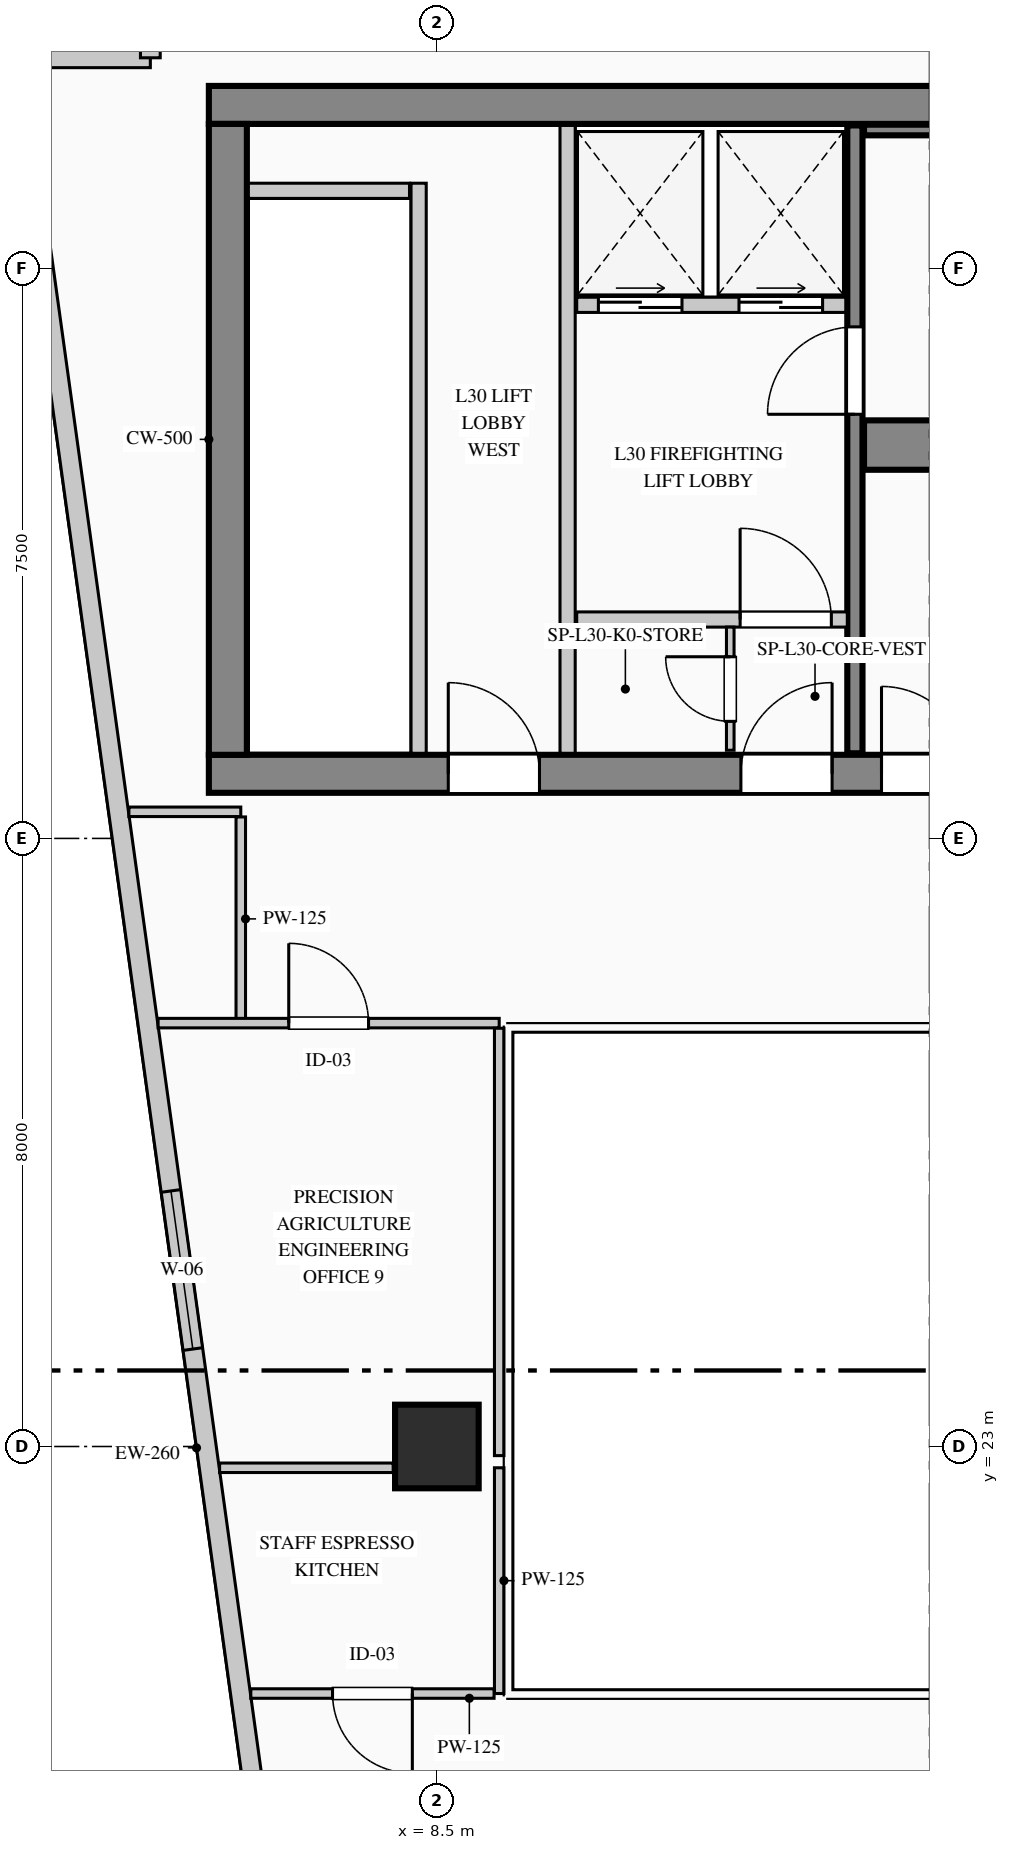
"""IFC4 building model, lengths in metres.
Left out: names, types, materials, properties, quantities, classifications, styles, units other than length and angle.
Written with IfcOpenShell. Run it as: python <this file> out.ifc"""

import sys

from ifc_helpers import new_model, si_unit, direction, frame, frame_2d, origin, origin_2d, place, context, subcontext, project, spatial, rectangle, extrude, element, fill, save


model = new_model("IFC4")
c1 = context("Model", 3, precision=1e-05, world=origin(), true_north=direction((0.0, 1.0)))
c2 = subcontext(c1, "Body", "Model", "MODEL_VIEW")
j1 = project(units=[si_unit("LENGTHUNIT", "METRE"), si_unit("PLANEANGLEUNIT", "RADIAN")], contexts=[c1])
p1 = place(None, origin())
s1 = spatial("IfcSite", under=j1, at=p1, CompositionType="ELEMENT")
p2 = place(p1, origin())
s2 = spatial("IfcBuilding", under=s1, at=p2, CompositionType="ELEMENT")
p3 = place(p2, frame((0.0, 0.0, 131.15)))
s3 = spatial("IfcBuildingStorey", under=s2, at=p3, CompositionType="ELEMENT", Elevation=131.15)
p4 = place(p3, frame((5.5, 40.65, 0.0), z_axis=(0.0, 0.0, 1.0), x_axis=(1.0, 0.0, 0.0)))
e1 = element("IfcWall", 1, at=p4, inside=s3, PredefinedType="SHEAR", context=c2, shape_type="SweptSolid", body=[
    extrude(rectangle(XDim=17.85, YDim=0.5, at=frame_2d((8.925, 0.0))), origin(), (0.0, 0.0, 1.0), 3.95),
])
p5 = place(p4, frame((15.945, 0.0, 0.0)))
e2 = element("IfcOpeningElement", 2, at=p5, cuts=e1, PredefinedType="OPENING", context=c2, shape_type="SweptSolid", body=[
    extrude(rectangle(XDim=1.18, YDim=2.25, at=frame_2d((0.59, 1.125))), frame((0.0, 0.26, 0.0), z_axis=(0.0, -1.0, 0.0), x_axis=(1.0, 0.0, 0.0)), (0.0, 0.0, 1.0), 0.52),
])
p6 = place(p3, frame((5.5, 31.85, 0.0), z_axis=(0.0, 0.0, 1.0), x_axis=(1.0, 0.0, 0.0)))
e3 = element("IfcWall", 3, at=p6, inside=s3, PredefinedType="SHEAR", context=c2, shape_type="SweptSolid", body=[
    extrude(rectangle(XDim=17.85, YDim=0.5, at=frame_2d((8.925, 0.0))), origin(), (0.0, 0.0, 1.0), 3.95),
])
p7 = place(p6, frame((3.15, 0.0, 0.0)))
e4 = element("IfcOpeningElement", 4, at=p7, cuts=e3, PredefinedType="OPENING", context=c2, shape_type="SweptSolid", body=[
    extrude(rectangle(XDim=1.2, YDim=2.2, at=frame_2d((0.6, 1.1))), frame((0.0, 0.26, 0.0), z_axis=(0.0, -1.0, 0.0), x_axis=(1.0, 0.0, 0.0)), (0.0, 0.0, 1.0), 0.52),
])
p8 = place(p6, frame((7.0, 0.0, 0.0)))
e5 = element("IfcOpeningElement", 5, at=p8, cuts=e3, PredefinedType="OPENING", context=c2, shape_type="SweptSolid", body=[
    extrude(rectangle(XDim=1.2, YDim=2.2, at=frame_2d((0.6, 1.1))), frame((0.0, 0.26, 0.0), z_axis=(0.0, -1.0, 0.0), x_axis=(1.0, 0.0, 0.0)), (0.0, 0.0, 1.0), 0.52),
])
p9 = place(p6, frame((8.85, 0.0, 0.0)))
e6 = element("IfcOpeningElement", 6, at=p9, cuts=e3, PredefinedType="OPENING", context=c2, shape_type="SweptSolid", body=[
    extrude(rectangle(XDim=1.15, YDim=2.2, at=frame_2d((0.575, 1.1))), frame((0.0, 0.26, 0.0), z_axis=(0.0, -1.0, 0.0), x_axis=(1.0, 0.0, 0.0)), (0.0, 0.0, 1.0), 0.52),
])
p10 = place(p6, frame((15.95, 0.0, 0.0)))
e7 = element("IfcOpeningElement", 7, at=p10, cuts=e3, PredefinedType="OPENING", context=c2, shape_type="SweptSolid", body=[
    extrude(rectangle(XDim=1.2, YDim=2.2, at=frame_2d((0.6, 1.1))), frame((0.0, 0.26, 0.0), z_axis=(0.0, -1.0, 0.0), x_axis=(1.0, 0.0, 0.0)), (0.0, 0.0, 1.0), 0.52),
])
p11 = place(p3, frame((5.75, 32.1, 0.0), z_axis=(0.0, 0.0, 1.0), x_axis=(0.0, 1.0, 0.0)))
e8 = element("IfcWall", 8, at=p11, inside=s3, PredefinedType="SHEAR", context=c2, shape_type="SweptSolid", body=[
    extrude(rectangle(XDim=8.3, YDim=0.5, at=frame_2d((4.15, 0.0))), origin(), (0.0, 0.0, 1.0), 3.95),
])
p12 = place(p3, frame((14.0, 32.12, 0.0), z_axis=(0.0, 0.0, 1.0), x_axis=(0.0, 1.0, 0.0)))
e9 = element("IfcWall", 9, at=p12, inside=s3, PredefinedType="SHEAR", context=c2, shape_type="SweptSolid", body=[
    extrude(rectangle(XDim=8.26, YDim=0.2, at=frame_2d((4.13, 0.0))), origin(), (0.0, 0.0, 1.0), 3.95),
])
p13 = place(p12, frame((4.46, 0.0, 0.0)))
e10 = element("IfcOpeningElement", 10, at=p13, cuts=e9, PredefinedType="OPENING", context=c2, shape_type="SweptSolid", body=[
    extrude(rectangle(XDim=1.15, YDim=2.2, at=frame_2d((0.575, 1.1))), frame((0.0, 0.11, 0.0), z_axis=(0.0, -1.0, 0.0), x_axis=(1.0, 0.0, 0.0)), (0.0, 0.0, 1.0), 0.22),
])
p14 = place(p3, frame((14.12, 36.175, 0.0), z_axis=(0.0, 0.0, 1.0), x_axis=(1.0, 0.0, 0.0)))
e11 = element("IfcWall", 11, at=p14, inside=s3, PredefinedType="SHEAR", context=c2, shape_type="SweptSolid", body=[
    extrude(rectangle(XDim=7.01, YDim=0.65, at=frame_2d((3.505, 0.0))), origin(), (0.0, 0.0, 1.0), 3.95),
])
p15 = place(p3, frame((14.12, 40.32, 0.0), z_axis=(0.0, 0.0, 1.0), x_axis=(1.0, 0.0, 0.0)))
e12 = element("IfcWall", 12, at=p15, inside=s3, PredefinedType="SHEAR", context=c2, shape_type="SweptSolid", body=[
    extrude(rectangle(XDim=7.01, YDim=0.14, at=frame_2d((3.505, 0.0))), origin(), (0.0, 0.0, 1.0), 3.95),
])
p16 = place(p3, frame((8.5, 23.0, 0.0), z_axis=(0.0, 0.0, 1.0), x_axis=(1.0, 0.0, 0.0)))
e13 = element("IfcColumn", 13, at=p16, inside=s3, PredefinedType="COLUMN", context=c2, shape_type="SweptSolid", body=[
    extrude(rectangle(XDim=1.1, YDim=1.1, at=origin_2d()), origin(), (0.0, 0.0, 1.0), 3.95),
])
p17 = place(p3, frame((7.993, 4.73, 0.0), z_axis=(0.0, 0.0, 1.0), x_axis=(-0.136989009016, 0.990572567462, 0.0)))
e14 = element("IfcWall", 14, at=p17, inside=s3, PredefinedType="STANDARD", context=c2, shape_type="SweptSolid", body=[
    extrude(rectangle(XDim=36.888, YDim=0.26, at=frame_2d((18.444, 0.0))), origin(), (0.0, 0.0, 1.0), 3.69),
])
p18 = place(p17, frame((19.738, 0.0, 0.9)))
e15 = element("IfcOpeningElement", 15, at=p18, cuts=e14, PredefinedType="OPENING", context=c2, shape_type="SweptSolid", body=[
    extrude(rectangle(XDim=2.1, YDim=2.0, at=frame_2d((1.05, 1.0))), frame((0.0, 0.14, 0.0), z_axis=(0.0, -1.0, 0.0), x_axis=(1.0, 0.0, 0.0)), (0.0, 0.0, 1.0), 0.28),
])
p19 = place(p3, frame((2.94, 41.27, 0.0), z_axis=(0.0, 0.0, 1.0), x_axis=(1.0, 0.0, 0.0)))
e16 = element("IfcWall", 16, at=p19, inside=s3, PredefinedType="STANDARD", context=c2, shape_type="SweptSolid", body=[
    extrude(rectangle(XDim=1.79, YDim=0.26, at=frame_2d((0.895, 0.0))), origin(), (0.0, 0.0, 1.0), 3.69),
])
p20 = place(p3, frame((4.73, 41.27, 0.0), z_axis=(0.0, 0.0, 1.0), x_axis=(0.0, 1.0, 0.0)))
e17 = element("IfcWall", 17, at=p20, inside=s3, PredefinedType="STANDARD", context=c2, shape_type="SweptSolid", body=[
    extrude(rectangle(XDim=2.1, YDim=0.26, at=frame_2d((1.05, 0.0))), origin(), (0.0, 0.0, 1.0), 3.69),
])
p21 = place(p3, frame((8.26, 32.12, 0.0), z_axis=(0.0, 0.0, 1.0), x_axis=(0.0, 1.0, 0.0)))
e18 = element("IfcWall", 18, at=p21, inside=s3, PredefinedType="PARTITIONING", context=c2, shape_type="SweptSolid", body=[
    extrude(rectangle(XDim=7.5, YDim=0.2, at=frame_2d((3.75, 0.0))), origin(), (0.0, 0.0, 1.0), 3.69),
])
p22 = place(p3, frame((6.02, 39.52, 0.0), z_axis=(0.0, 0.0, 1.0), x_axis=(1.0, 0.0, 0.0)))
e19 = element("IfcWall", 19, at=p22, inside=s3, PredefinedType="PARTITIONING", context=c2, shape_type="SweptSolid", body=[
    extrude(rectangle(XDim=2.12, YDim=0.2, at=frame_2d((1.06, 0.0))), origin(), (0.0, 0.0, 1.0), 3.69),
])
p23 = place(p3, frame((10.22, 32.12, 0.0), z_axis=(0.0, 0.0, 1.0), x_axis=(0.0, 1.0, 0.0)))
e20 = element("IfcWall", 20, at=p23, inside=s3, PredefinedType="PARTITIONING", context=c2, shape_type="SweptSolid", body=[
    extrude(rectangle(XDim=8.26, YDim=0.2, at=frame_2d((4.13, 0.0))), origin(), (0.0, 0.0, 1.0), 3.69),
])
p24 = place(p3, frame((10.34, 38.02, 0.0), z_axis=(0.0, 0.0, 1.0), x_axis=(1.0, 0.0, 0.0)))
e21 = element("IfcWall", 21, at=p24, inside=s3, PredefinedType="PARTITIONING", context=c2, shape_type="SweptSolid", body=[
    extrude(rectangle(XDim=3.54, YDim=0.2, at=frame_2d((1.77, 0.0))), origin(), (0.0, 0.0, 1.0), 3.69),
])
p25 = place(p24, frame((0.285, 0.0, 0.0)))
e22 = element("IfcOpeningElement", 22, at=p25, cuts=e21, PredefinedType="OPENING", context=c2, shape_type="SweptSolid", body=[
    extrude(rectangle(XDim=1.1, YDim=2.2, at=frame_2d((0.55, 1.1))), frame((0.0, 0.11, 0.0), z_axis=(0.0, -1.0, 0.0), x_axis=(1.0, 0.0, 0.0)), (0.0, 0.0, 1.0), 0.22),
])
p26 = place(p24, frame((2.135, 0.0, 0.0)))
e23 = element("IfcOpeningElement", 23, at=p26, cuts=e21, PredefinedType="OPENING", context=c2, shape_type="SweptSolid", body=[
    extrude(rectangle(XDim=1.1, YDim=2.2, at=frame_2d((0.55, 1.1))), frame((0.0, 0.11, 0.0), z_axis=(0.0, -1.0, 0.0), x_axis=(1.0, 0.0, 0.0)), (0.0, 0.0, 1.0), 0.22),
])
p27 = place(p3, frame((10.34, 33.88, 0.0), z_axis=(0.0, 0.0, 1.0), x_axis=(1.0, 0.0, 0.0)))
e24 = element("IfcWall", 24, at=p27, inside=s3, PredefinedType="PARTITIONING", context=c2, shape_type="SweptSolid", body=[
    extrude(rectangle(XDim=3.56, YDim=0.2, at=frame_2d((1.78, 0.0))), origin(), (0.0, 0.0, 1.0), 3.69),
])
p28 = place(p27, frame((2.15, 0.0, 0.0)))
e25 = element("IfcOpeningElement", 25, at=p28, cuts=e24, PredefinedType="OPENING", context=c2, shape_type="SweptSolid", body=[
    extrude(rectangle(XDim=1.2, YDim=2.2, at=frame_2d((0.6, 1.1))), frame((0.0, 0.11, 0.0), z_axis=(0.0, -1.0, 0.0), x_axis=(1.0, 0.0, 0.0)), (0.0, 0.0, 1.0), 0.22),
])
p29 = place(p3, frame((12.36, 32.16, 0.0), z_axis=(0.0, 0.0, 1.0), x_axis=(0.0, 1.0, 0.0)))
e26 = element("IfcWall", 26, at=p29, inside=s3, PredefinedType="PARTITIONING", context=c2, shape_type="SweptSolid", body=[
    extrude(rectangle(XDim=1.62, YDim=0.1, at=frame_2d((0.81, 0.0))), origin(), (0.0, 0.0, 1.0), 3.69),
])
p30 = place(p29, frame((0.38, 0.0, 0.0)))
e27 = element("IfcOpeningElement", 27, at=p30, cuts=e26, PredefinedType="OPENING", context=c2, shape_type="SweptSolid", body=[
    extrude(rectangle(XDim=0.85, YDim=2.1, at=frame_2d((0.425, 1.05))), frame((0.0, 0.06, 0.0), z_axis=(0.0, -1.0, 0.0), x_axis=(1.0, 0.0, 0.0)), (0.0, 0.0, 1.0), 0.12),
])
p31 = place(p3, frame((9.32, 22.72, 0.0), z_axis=(0.0, 0.0, 1.0), x_axis=(0.0, -1.0, 0.0)))
e28 = element("IfcWall", 28, at=p31, inside=s3, PredefinedType="PARTITIONING", context=c2, shape_type="SweptSolid", body=[
    extrude(rectangle(XDim=2.97, YDim=0.125, at=frame_2d((1.485, 0.0))), origin(), (0.0, 0.0, 1.0), 3.375),
])
p32 = place(p3, frame((9.252, 19.75, 0.0), z_axis=(0.0, 0.0, 1.0), x_axis=(-1.0, 0.0, 0.0)))
e29 = element("IfcWall", 29, at=p32, inside=s3, PredefinedType="PARTITIONING", context=c2, shape_type="SweptSolid", body=[
    extrude(rectangle(XDim=3.2, YDim=0.125, at=frame_2d((1.6, 0.0))), origin(), (0.0, 0.0, 1.0), 3.69),
])
p33 = place(p32, frame((1.075, 0.0, 0.0)))
e30 = element("IfcOpeningElement", 30, at=p33, cuts=e29, PredefinedType="OPENING", context=c2, shape_type="SweptSolid", body=[
    extrude(rectangle(XDim=1.05, YDim=2.15, at=frame_2d((0.525, 1.075))), frame((0.0, 0.073, 0.0), z_axis=(0.0, -1.0, 0.0), x_axis=(1.0, 0.0, 0.0)), (0.0, 0.0, 1.0), 0.145),
])
p34 = place(p3, frame((5.641, 22.72, 0.0), z_axis=(0.0, 0.0, 1.0), x_axis=(1.0, 0.0, 0.0)))
e31 = element("IfcWall", 31, at=p34, inside=s3, PredefinedType="PARTITIONING", context=c2, shape_type="SweptSolid", body=[
    extrude(rectangle(XDim=2.284, YDim=0.125, at=frame_2d((1.142, 0.0))), origin(), (0.0, 0.0, 1.0), 3.69),
])
p35 = place(p3, frame((4.448, 31.35, 0.0), z_axis=(0.0, 0.0, 1.0), x_axis=(1.0, 0.0, 0.0)))
e32 = element("IfcWall", 32, at=p35, inside=s3, PredefinedType="PARTITIONING", context=c2, shape_type="SweptSolid", body=[
    extrude(rectangle(XDim=1.472, YDim=0.125, at=frame_2d((0.736, 0.0))), origin(), (0.0, 0.0, 1.0), 3.69),
])
p36 = place(p3, frame((5.92, 31.282, 0.0), z_axis=(0.0, 0.0, 1.0), x_axis=(0.0, -1.0, 0.0)))
e33 = element("IfcWall", 33, at=p36, inside=s3, PredefinedType="PARTITIONING", context=c2, shape_type="SweptSolid", body=[
    extrude(rectangle(XDim=2.682, YDim=0.125, at=frame_2d((1.341, 0.0))), origin(), (0.0, 0.0, 1.0), 3.69),
])
p37 = place(p3, frame((4.832, 28.57, 0.0), z_axis=(0.0, 0.0, 1.0), x_axis=(1.0, 0.0, 0.0)))
e34 = element("IfcWall", 34, at=p37, inside=s3, PredefinedType="PARTITIONING", context=c2, shape_type="SweptSolid", body=[
    extrude(rectangle(XDim=4.488, YDim=0.125, at=frame_2d((2.244, 0.0))), origin(), (0.0, 0.0, 1.0), 3.69),
])
p38 = place(p37, frame((1.719, 0.0, 0.0)))
e35 = element("IfcOpeningElement", 35, at=p38, cuts=e34, PredefinedType="OPENING", context=c2, shape_type="SweptSolid", body=[
    extrude(rectangle(XDim=1.05, YDim=2.15, at=frame_2d((0.525, 1.075))), frame((0.0, 0.073, 0.0), z_axis=(0.0, -1.0, 0.0), x_axis=(1.0, 0.0, 0.0)), (0.0, 0.0, 1.0), 0.145),
])
p39 = place(p3, frame((9.32, 28.502, 0.0), z_axis=(0.0, 0.0, 1.0), x_axis=(0.0, -1.0, 0.0)))
e36 = element("IfcWall", 36, at=p39, inside=s3, PredefinedType="PARTITIONING", context=c2, shape_type="SweptSolid", body=[
    extrude(rectangle(XDim=5.623, YDim=0.125, at=frame_2d((2.811, 0.0))), origin(), (0.0, 0.0, 1.0), 3.375),
])
p40 = place(p18, origin())
e37 = element("IfcWindow", 37, at=p40, inside=s3, PartitioningType="DOUBLE_PANEL_VERTICAL", PredefinedType="WINDOW", context=c2, shape_type="SweptSolid", body=[
    extrude(rectangle(XDim=2.1, YDim=2.0, at=frame_2d((1.05, 1.0))), frame((0.0, 0.03, 0.0), z_axis=(0.0, -1.0, 0.0), x_axis=(1.0, 0.0, 0.0)), (0.0, 0.0, 1.0), 0.06),
])
fill(e15, e37)
p41 = place(p7, origin())
e38 = element("IfcDoor", 38, at=p41, inside=s3, OperationType="SINGLE_SWING_LEFT", PredefinedType="DOOR", context=c2, shape_type="SweptSolid", body=[
    extrude(rectangle(XDim=1.2, YDim=2.2, at=frame_2d((0.6, 1.1))), frame((0.0, 0.025, 0.0), z_axis=(0.0, -1.0, 0.0), x_axis=(1.0, 0.0, 0.0)), (0.0, 0.0, 1.0), 0.05),
])
fill(e4, e38)
p42 = place(p8, origin())
e39 = element("IfcDoor", 39, at=p42, inside=s3, OperationType="SINGLE_SWING_RIGHT", PredefinedType="DOOR", context=c2, shape_type="SweptSolid", body=[
    extrude(rectangle(XDim=1.2, YDim=2.2, at=frame_2d((0.6, 1.1))), frame((0.0, 0.025, 0.0), z_axis=(0.0, -1.0, 0.0), x_axis=(1.0, 0.0, 0.0)), (0.0, 0.0, 1.0), 0.05),
])
fill(e5, e39)
p43 = place(p9, origin())
e40 = element("IfcDoor", 40, at=p43, inside=s3, OperationType="SINGLE_SWING_LEFT", PredefinedType="DOOR", context=c2, shape_type="SweptSolid", body=[
    extrude(rectangle(XDim=1.15, YDim=2.2, at=frame_2d((0.575, 1.1))), frame((0.0, 0.025, 0.0), z_axis=(0.0, -1.0, 0.0), x_axis=(1.0, 0.0, 0.0)), (0.0, 0.0, 1.0), 0.05),
])
fill(e6, e40)
p44 = place(p28, origin())
e41 = element("IfcDoor", 41, at=p44, inside=s3, OperationType="SINGLE_SWING_LEFT", PredefinedType="DOOR", context=c2, shape_type="SweptSolid", body=[
    extrude(rectangle(XDim=1.2, YDim=2.2, at=frame_2d((0.6, 1.1))), frame((0.0, 0.025, 0.0), z_axis=(0.0, -1.0, 0.0), x_axis=(1.0, 0.0, 0.0)), (0.0, 0.0, 1.0), 0.05),
])
fill(e25, e41)
p45 = place(p30, origin())
e42 = element("IfcDoor", 42, at=p45, inside=s3, OperationType="SINGLE_SWING_RIGHT", PredefinedType="DOOR", context=c2, shape_type="SweptSolid", body=[
    extrude(rectangle(XDim=0.85, YDim=2.1, at=frame_2d((0.425, 1.05))), frame((0.0, 0.025, 0.0), z_axis=(0.0, -1.0, 0.0), x_axis=(1.0, 0.0, 0.0)), (0.0, 0.0, 1.0), 0.05),
])
fill(e27, e42)
p46 = place(p13, origin())
e43 = element("IfcDoor", 43, at=p46, inside=s3, OperationType="SINGLE_SWING_LEFT", PredefinedType="DOOR", context=c2, shape_type="SweptSolid", body=[
    extrude(rectangle(XDim=1.15, YDim=2.2, at=frame_2d((0.575, 1.1))), frame((0.0, 0.025, 0.0), z_axis=(0.0, -1.0, 0.0), x_axis=(1.0, 0.0, 0.0)), (0.0, 0.0, 1.0), 0.05),
])
fill(e10, e43)
p47 = place(p25, origin())
e44 = element("IfcDoor", 44, at=p47, inside=s3, OperationType="DOUBLE_DOOR_SLIDING", PredefinedType="DOOR", context=c2, shape_type="SweptSolid", body=[
    extrude(rectangle(XDim=1.1, YDim=2.2, at=frame_2d((0.55, 1.1))), frame((0.0, 0.025, 0.0), z_axis=(0.0, -1.0, 0.0), x_axis=(1.0, 0.0, 0.0)), (0.0, 0.0, 1.0), 0.05),
])
fill(e22, e44)
p48 = place(p26, origin())
e45 = element("IfcDoor", 45, at=p48, inside=s3, OperationType="DOUBLE_DOOR_SLIDING", PredefinedType="DOOR", context=c2, shape_type="SweptSolid", body=[
    extrude(rectangle(XDim=1.1, YDim=2.2, at=frame_2d((0.55, 1.1))), frame((0.0, 0.025, 0.0), z_axis=(0.0, -1.0, 0.0), x_axis=(1.0, 0.0, 0.0)), (0.0, 0.0, 1.0), 0.05),
])
fill(e23, e45)
p49 = place(p33, origin())
e46 = element("IfcDoor", 46, at=p49, inside=s3, OperationType="SINGLE_SWING_LEFT", PredefinedType="DOOR", context=c2, shape_type="SweptSolid", body=[
    extrude(rectangle(XDim=1.05, YDim=2.15, at=frame_2d((0.525, 1.075))), frame((0.0, 0.025, 0.0), z_axis=(0.0, -1.0, 0.0), x_axis=(1.0, 0.0, 0.0)), (0.0, 0.0, 1.0), 0.05),
])
fill(e30, e46)
p50 = place(p38, origin())
e47 = element("IfcDoor", 47, at=p50, inside=s3, OperationType="SINGLE_SWING_LEFT", PredefinedType="DOOR", context=c2, shape_type="SweptSolid", body=[
    extrude(rectangle(XDim=1.05, YDim=2.15, at=frame_2d((0.525, 1.075))), frame((0.0, 0.025, 0.0), z_axis=(0.0, -1.0, 0.0), x_axis=(1.0, 0.0, 0.0)), (0.0, 0.0, 1.0), 0.05),
])
fill(e35, e47)
save(model, sys.argv[1])
